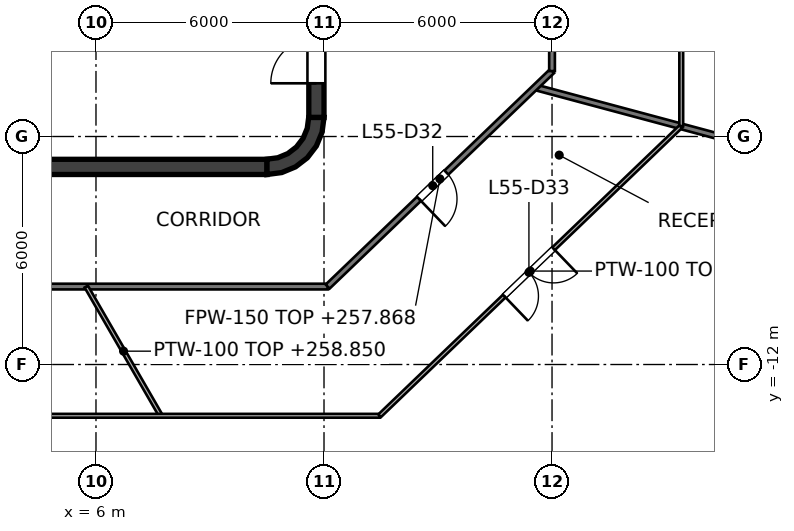
"""IFC4 building model, lengths in metres.
Left out: names, types, materials, properties, quantities, classifications, styles, units other than length and angle.
Written with IfcOpenShell. Run it as: python <this file> out.ifc"""

import sys

from ifc_helpers import new_model, si_unit, direction, frame, frame_2d, origin, place, context, subcontext, project, spatial, polyline, rectangle, outline, extrude, element, fill, save


model = new_model("IFC4")
c1 = context("Model", 3, precision=1e-05, world=origin(), true_north=direction((0.0, 1.0)))
c2 = subcontext(c1, "Body", "Model", "MODEL_VIEW")
j1 = project(units=[si_unit("LENGTHUNIT", "METRE"), si_unit("PLANEANGLEUNIT", "RADIAN")], contexts=[c1])
p1 = place(None, origin())
s1 = spatial("IfcSite", under=j1, at=p1, CompositionType="ELEMENT")
p2 = place(p1, origin())
s2 = spatial("IfcBuilding", under=s1, at=p2, CompositionType="ELEMENT")
p3 = place(p2, frame((0.0, 0.0, 255.0)))
s3 = spatial("IfcBuildingStorey", under=s2, at=p3, CompositionType="ELEMENT", Elevation=255.0)
p4 = place(p3, frame((-10.5, -6.8, 0.0), z_axis=(0.0, 0.0, 1.0), x_axis=(1.0, 0.0, 0.0)))
e1 = element("IfcWall", 1, at=p4, inside=s3, PredefinedType="SHEAR", context=c2, shape_type="SweptSolid", body=[
    extrude(rectangle(XDim=21.0, YDim=0.4, at=frame_2d((10.5, 0.0))), origin(), (0.0, 0.0, 1.0), 4.0),
])
p5 = place(p3, frame((11.8, -5.5, 0.0), z_axis=(0.0, 0.0, 1.0), x_axis=(0.0, 1.0, 0.0)))
e2 = element("IfcWall", 2, at=p5, inside=s3, PredefinedType="SHEAR", context=c2, shape_type="SweptSolid", body=[
    extrude(rectangle(XDim=11.0, YDim=0.4, at=frame_2d((5.5, 0.0))), origin(), (0.0, 0.0, 1.0), 4.0),
])
p6 = place(p5, frame((3.2, 0.0, 0.0)))
e3 = element("IfcOpeningElement", 3, at=p6, cuts=e2, PredefinedType="OPENING", context=c2, shape_type="SweptSolid", body=[
    extrude(rectangle(XDim=1.0, YDim=2.1, at=frame_2d((0.5, 1.05))), frame((0.0, 0.2, 0.0), z_axis=(0.0, -1.0, 0.0), x_axis=(1.0, 0.0, 0.0)), (0.0, 0.0, 1.0), 0.4),
])
p7 = place(p5, frame((6.1, 0.0, 0.0)))
e4 = element("IfcOpeningElement", 4, at=p7, cuts=e2, PredefinedType="OPENING", context=c2, shape_type="SweptSolid", body=[
    extrude(rectangle(XDim=1.0, YDim=2.1, at=frame_2d((0.5, 1.05))), frame((0.0, 0.2, 0.0), z_axis=(0.0, -1.0, 0.0), x_axis=(1.0, 0.0, 0.0)), (0.0, 0.0, 1.0), 0.4),
])
p8 = place(p5, frame((0.9, 0.0, 0.0)))
e5 = element("IfcOpeningElement", 5, at=p8, cuts=e2, PredefinedType="OPENING", context=c2, shape_type="SweptSolid", body=[
    extrude(rectangle(XDim=1.2, YDim=2.1, at=frame_2d((0.6, 1.05))), frame((0.0, 0.2, 0.0), z_axis=(0.0, -1.0, 0.0), x_axis=(1.0, 0.0, 0.0)), (0.0, 0.0, 1.0), 0.4),
])
p9 = place(p5, frame((8.9, 0.0, 0.0)))
e6 = element("IfcOpeningElement", 6, at=p9, cuts=e2, PredefinedType="OPENING", context=c2, shape_type="SweptSolid", body=[
    extrude(rectangle(XDim=1.2, YDim=2.1, at=frame_2d((0.6, 1.05))), frame((0.0, 0.2, 0.0), z_axis=(0.0, -1.0, 0.0), x_axis=(1.0, 0.0, 0.0)), (0.0, 0.0, 1.0), 0.4),
])
p10 = place(p3, origin())
e7 = element("IfcWall", 7, at=p10, inside=s3, PredefinedType="SHEAR", context=c2, shape_type="SweptSolid", body=[
    extrude(outline(polyline([(12.0, -5.5), (11.596, -5.5), (11.559, -5.784), (11.45, -6.048), (11.275, -6.275), (11.048, -6.45), (10.784, -6.559), (10.5, -6.596), (10.5, -7.0), (10.888, -6.949), (11.25, -6.799), (11.561, -6.561), (11.799, -6.25), (11.949, -5.888), (12.0, -5.5)])), origin(), (0.0, 0.0, 1.0), 4.0),
])
p11 = place(p3, frame((9.0, -6.6, 0.0), z_axis=(0.0, 0.0, 1.0), x_axis=(0.0, 1.0, 0.0)))
e8 = element("IfcWall", 8, at=p11, inside=s3, PredefinedType="SOLIDWALL", context=c2, shape_type="SweptSolid", body=[
    extrude(rectangle(XDim=2.5, YDim=0.25, at=frame_2d((1.25, 0.0))), origin(), (0.0, 0.0, 1.0), 3.85),
])
p12 = place(p11, frame((0.65, 0.0, 0.0)))
e9 = element("IfcOpeningElement", 9, at=p12, cuts=e8, PredefinedType="OPENING", context=c2, shape_type="SweptSolid", body=[
    extrude(rectangle(XDim=1.2, YDim=2.1, at=frame_2d((0.6, 1.05))), frame((0.0, 0.125, 0.0), z_axis=(0.0, -1.0, 0.0), x_axis=(1.0, 0.0, 0.0)), (0.0, 0.0, 1.0), 0.25),
])
p13 = place(p3, frame((3.275, -3.975, 0.0), z_axis=(0.0, 0.0, 1.0), x_axis=(1.0, 0.0, 0.0)))
e10 = element("IfcWall", 10, at=p13, inside=s3, PredefinedType="SOLIDWALL", context=c2, shape_type="SweptSolid", body=[
    extrude(rectangle(XDim=5.85, YDim=0.25, at=frame_2d((2.925, 0.0))), origin(), (0.0, 0.0, 1.0), 3.85),
])
for number, where, z_axis, x_axis in (
    (11, (5.9, -3.85, 0.0), (0.0, 0.0, 1.0), (0.0, 1.0, 0.0)),
    (12, (9.0, -3.85, 0.0), (0.0, 0.0, 1.0), (0.0, 1.0, 0.0)),
):
    element("IfcWall", number, at=place(p3, frame(where, z_axis=z_axis, x_axis=x_axis)), inside=s3, PredefinedType="SOLIDWALL", context=c2, shape_type="SweptSolid", body=[
        extrude(rectangle(XDim=2.2, YDim=0.25, at=frame_2d((1.1, 0.0))), origin(), (0.0, 0.0, 1.0), 3.85),
    ])
p14 = place(p3, frame((17.556, -4.704, 0.0), z_axis=(0.0, 0.0, 1.0), x_axis=(0.9659158877, -0.258856133573, 0.0)))
e13 = element("IfcWall", 13, at=p14, inside=s3, PredefinedType="PARTITIONING", context=c2, shape_type="SweptSolid", body=[
    extrude(rectangle(XDim=11.521, YDim=0.15, at=frame_2d((5.76, 0.0))), origin(), (0.0, 0.0, 1.0), 3.477),
])
p15 = place(p3, frame((-12.095, -9.949, 0.0), z_axis=(0.0, 0.0, 1.0), x_axis=(1.0, 0.0, 0.0)))
e14 = element("IfcWall", 14, at=p15, inside=s3, PredefinedType="PARTITIONING", context=c2, shape_type="SweptSolid", body=[
    extrude(rectangle(XDim=24.19, YDim=0.15, at=frame_2d((12.095, 0.0))), origin(), (0.0, 0.0, 1.0), 2.927),
])
p16 = place(p15, frame((4.086, 0.0, 0.0)))
e15 = element("IfcOpeningElement", 15, at=p16, cuts=e14, PredefinedType="OPENING", context=c2, shape_type="SweptSolid", body=[
    extrude(rectangle(XDim=1.0, YDim=2.1, at=frame_2d((0.5, 1.05))), frame((0.0, 0.075, 0.0), z_axis=(0.0, -1.0, 0.0), x_axis=(1.0, 0.0, 0.0)), (0.0, 0.0, 1.0), 0.15),
])
p17 = place(p15, frame((9.061, 0.0, 0.0)))
e16 = element("IfcOpeningElement", 16, at=p17, cuts=e14, PredefinedType="OPENING", context=c2, shape_type="SweptSolid", body=[
    extrude(rectangle(XDim=1.0, YDim=2.1, at=frame_2d((0.5, 1.05))), frame((0.0, 0.075, 0.0), z_axis=(0.0, -1.0, 0.0), x_axis=(1.0, 0.0, 0.0)), (0.0, 0.0, 1.0), 0.15),
])
p18 = place(p15, frame((14.417, 0.0, 0.0)))
e17 = element("IfcOpeningElement", 17, at=p18, cuts=e14, PredefinedType="OPENING", context=c2, shape_type="SweptSolid", body=[
    extrude(rectangle(XDim=1.0, YDim=2.1, at=frame_2d((0.5, 1.05))), frame((0.0, 0.075, 0.0), z_axis=(0.0, -1.0, 0.0), x_axis=(1.0, 0.0, 0.0)), (0.0, 0.0, 1.0), 0.15),
])
p19 = place(p3, frame((12.095, -9.949, 0.0), z_axis=(0.0, 0.0, 1.0), x_axis=(0.721348586031, 0.692572174889, 0.0)))
e18 = element("IfcWall", 18, at=p19, inside=s3, PredefinedType="PARTITIONING", context=c2, shape_type="SweptSolid", body=[
    extrude(rectangle(XDim=8.187, YDim=0.15, at=frame_2d((4.094, 0.0))), origin(), (0.0, 0.0, 1.0), 2.868),
])
p20 = place(p19, frame((3.334, 0.0, 0.0)))
e19 = element("IfcOpeningElement", 19, at=p20, cuts=e18, PredefinedType="OPENING", context=c2, shape_type="SweptSolid", body=[
    extrude(rectangle(XDim=1.0, YDim=2.1, at=frame_2d((0.5, 1.05))), frame((0.0, 0.075, 0.0), z_axis=(0.0, -1.0, 0.0), x_axis=(1.0, 0.0, 0.0)), (0.0, 0.0, 1.0), 0.15),
])
p21 = place(p3, frame((18.0, -4.278, 0.0), z_axis=(0.0, 0.0, 1.0), x_axis=(0.0, 1.0, 0.0)))
e20 = element("IfcWall", 20, at=p21, inside=s3, PredefinedType="PARTITIONING", context=c2, shape_type="SweptSolid", body=[
    extrude(rectangle(XDim=8.556, YDim=0.15, at=frame_2d((4.278, 0.0))), origin(), (0.0, 0.0, 1.0), 2.868),
])
p22 = place(p21, frame((2.111, 0.0, 0.0)))
e21 = element("IfcOpeningElement", 21, at=p22, cuts=e20, PredefinedType="OPENING", context=c2, shape_type="SweptSolid", body=[
    extrude(rectangle(XDim=1.0, YDim=2.1, at=frame_2d((0.5, 1.05))), frame((0.0, 0.075, 0.0), z_axis=(0.0, -1.0, 0.0), x_axis=(1.0, 0.0, 0.0)), (0.0, 0.0, 1.0), 0.15),
])
p23 = place(p3, frame((5.744, -9.949, 0.0), z_axis=(0.0, 0.0, 1.0), x_axis=(0.500011323479, -0.866018866072, 0.0)))
e22 = element("IfcWall", 22, at=p23, inside=s3, PredefinedType="PARTITIONING", context=c2, shape_type="SweptSolid", body=[
    extrude(rectangle(XDim=3.926, YDim=0.1, at=frame_2d((1.963, 0.0))), origin(), (0.0, 0.0, 1.0), 3.85),
])
p24 = place(p3, frame((-13.349, -13.349, 0.0), z_axis=(0.0, 0.0, 1.0), x_axis=(1.0, 0.0, 0.0)))
e23 = element("IfcWall", 23, at=p24, inside=s3, PredefinedType="PARTITIONING", context=c2, shape_type="SweptSolid", body=[
    extrude(rectangle(XDim=26.812, YDim=0.1, at=frame_2d((13.406, 0.0))), origin(), (0.0, 0.0, 1.0), 2.927),
])
p25 = place(p24, frame((9.448, 0.0, 0.0)))
e24 = element("IfcOpeningElement", 24, at=p25, cuts=e23, PredefinedType="OPENING", context=c2, shape_type="SweptSolid", body=[
    extrude(rectangle(XDim=0.9, YDim=2.1, at=frame_2d((0.45, 1.05))), frame((0.0, 0.05, 0.0), z_axis=(0.0, -1.0, 0.0), x_axis=(1.0, 0.0, 0.0)), (0.0, 0.0, 1.0), 0.1),
])
p26 = place(p3, frame((13.463, -13.349, 0.0), z_axis=(0.0, 0.0, 1.0), x_axis=(0.721271950356, 0.692651985942, 0.0)))
e25 = element("IfcWall", 25, at=p26, inside=s3, PredefinedType="PARTITIONING", context=c2, shape_type="SweptSolid", body=[
    extrude(rectangle(XDim=10.996, YDim=0.1, at=frame_2d((5.498, 0.0))), origin(), (0.0, 0.0, 1.0), 2.877),
])
p27 = place(p26, frame((4.547, 0.0, 0.0)))
e26 = element("IfcOpeningElement", 26, at=p27, cuts=e25, PredefinedType="OPENING", context=c2, shape_type="SweptSolid", body=[
    extrude(rectangle(XDim=1.8, YDim=2.1, at=frame_2d((0.9, 1.05))), frame((0.0, 0.05, 0.0), z_axis=(0.0, -1.0, 0.0), x_axis=(1.0, 0.0, 0.0)), (0.0, 0.0, 1.0), 0.1),
])
p28 = place(p3, frame((21.4, -5.727, 0.0), z_axis=(0.0, 0.0, 1.0), x_axis=(0.0, 1.0, 0.0)))
e27 = element("IfcWall", 27, at=p28, inside=s3, PredefinedType="PARTITIONING", context=c2, shape_type="SweptSolid", body=[
    extrude(rectangle(XDim=11.454, YDim=0.1, at=frame_2d((5.727, 0.0))), origin(), (0.0, 0.0, 1.0), 2.868),
])
p29 = place(p12, origin())
e28 = element("IfcDoor", 28, at=p29, inside=s3, OperationType="SINGLE_SWING_LEFT", PredefinedType="DOOR", context=c2, shape_type="SweptSolid", body=[
    extrude(rectangle(XDim=1.2, YDim=2.1, at=frame_2d((0.6, 1.05))), frame((0.0, 0.025, 0.0), z_axis=(0.0, -1.0, 0.0), x_axis=(1.0, 0.0, 0.0)), (0.0, 0.0, 1.0), 0.05),
])
fill(e9, e28)
p30 = place(p8, origin())
e29 = element("IfcDoor", 29, at=p30, inside=s3, OperationType="SINGLE_SWING_LEFT", PredefinedType="DOOR", context=c2, shape_type="SweptSolid", body=[
    extrude(rectangle(XDim=1.2, YDim=2.1, at=frame_2d((0.6, 1.05))), frame((0.0, 0.025, 0.0), z_axis=(0.0, -1.0, 0.0), x_axis=(1.0, 0.0, 0.0)), (0.0, 0.0, 1.0), 0.05),
])
fill(e5, e29)
p31 = place(p20, origin())
e30 = element("IfcDoor", 30, at=p31, inside=s3, OperationType="SINGLE_SWING_LEFT", PredefinedType="DOOR", context=c2, shape_type="SweptSolid", body=[
    extrude(rectangle(XDim=1.0, YDim=2.1, at=frame_2d((0.5, 1.05))), frame((0.0, 0.025, 0.0), z_axis=(0.0, -1.0, 0.0), x_axis=(1.0, 0.0, 0.0)), (0.0, 0.0, 1.0), 0.05),
])
fill(e19, e30)
p32 = place(p27, origin())
e31 = element("IfcDoor", 31, at=p32, inside=s3, OperationType="DOUBLE_DOOR_SINGLE_SWING", PredefinedType="DOOR", context=c2, shape_type="SweptSolid", body=[
    extrude(rectangle(XDim=1.8, YDim=2.1, at=frame_2d((0.9, 1.05))), frame((0.0, 0.025, 0.0), z_axis=(0.0, -1.0, 0.0), x_axis=(1.0, 0.0, 0.0)), (0.0, 0.0, 1.0), 0.05),
])
fill(e26, e31)
save(model, sys.argv[1])
